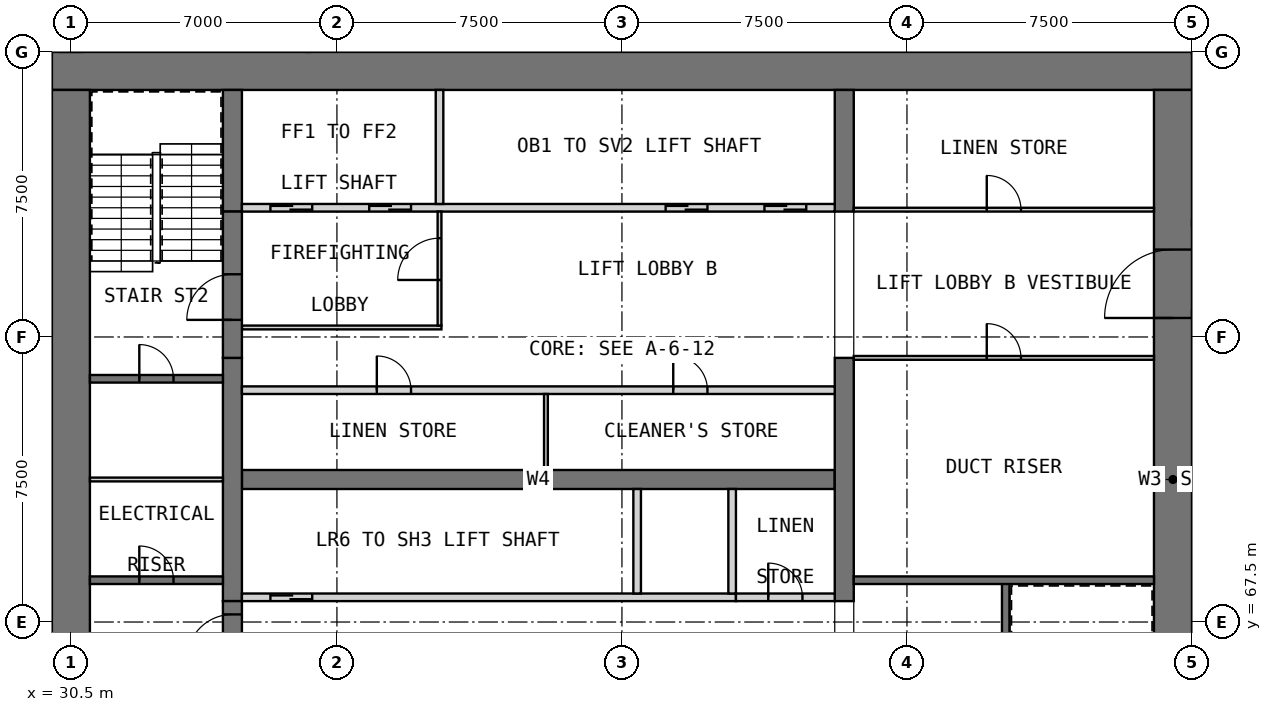
"""IFC4 building model, lengths in metres.
Left out: names, types, materials, properties, quantities, classifications, styles, units other than length and angle.
Written with IfcOpenShell. Run it as: python <this file> out.ifc"""

import sys

from ifc_helpers import new_model, si_unit, direction, frame, frame_2d, origin, place, context, subcontext, project, spatial, rectangle, extrude, element, fill, save


model = new_model("IFC4")
c1 = context("Model", 3, precision=1e-05, world=origin(), true_north=direction((0.0, 1.0)))
c2 = subcontext(c1, "Body", "Model", "MODEL_VIEW")
j1 = project(units=[si_unit("LENGTHUNIT", "METRE"), si_unit("PLANEANGLEUNIT", "RADIAN")], contexts=[c1])
p1 = place(None, origin())
s1 = spatial("IfcSite", under=j1, at=p1, CompositionType="ELEMENT")
p2 = place(p1, origin())
s2 = spatial("IfcBuilding", under=s1, at=p2, CompositionType="ELEMENT")
p3 = place(p2, frame((0.0, 0.0, 89.9)))
s3 = spatial("IfcBuildingStorey", under=s2, at=p3, CompositionType="ELEMENT", Elevation=89.9)
p4 = place(p3, frame((30.0, 82.0, 0.0), z_axis=(0.0, 0.0, 1.0), x_axis=(1.0, 0.0, 0.0)))
e1 = element("IfcWall", 1, at=p4, inside=s3, PredefinedType="SHEAR", context=c2, shape_type="SweptSolid", body=[
    extrude(rectangle(XDim=30.0, YDim=1.0, at=frame_2d((15.0, 0.0))), origin(), (0.0, 0.0, 1.0), 3.6),
])
p5 = place(p3, frame((30.5, 61.0, 0.0), z_axis=(0.0, 0.0, 1.0), x_axis=(0.0, 1.0, 0.0)))
e2 = element("IfcWall", 2, at=p5, inside=s3, PredefinedType="SHEAR", context=c2, shape_type="SweptSolid", body=[
    extrude(rectangle(XDim=20.5, YDim=1.0, at=frame_2d((10.25, 0.0))), origin(), (0.0, 0.0, 1.0), 3.6),
])
p6 = place(p3, frame((59.5, 61.0, 0.0), z_axis=(0.0, 0.0, 1.0), x_axis=(0.0, 1.0, 0.0)))
e3 = element("IfcWall", 3, at=p6, inside=s3, PredefinedType="SHEAR", context=c2, shape_type="SweptSolid", body=[
    extrude(rectangle(XDim=20.5, YDim=1.0, at=frame_2d((10.25, 0.0))), origin(), (0.0, 0.0, 1.0), 3.6),
])
p7 = place(p6, frame((14.5, 0.0, 0.0)))
e4 = element("IfcOpeningElement", 4, at=p7, cuts=e3, PredefinedType="OPENING", context=c2, shape_type="SweptSolid", body=[
    extrude(rectangle(XDim=1.8, YDim=2.1, at=frame_2d((0.9, 1.05))), frame((0.0, 0.51, 0.0), z_axis=(0.0, -1.0, 0.0), x_axis=(1.0, 0.0, 0.0)), (0.0, 0.0, 1.0), 1.02),
])
p8 = place(p3, frame((35.0, 71.25, 0.0), z_axis=(0.0, 0.0, 1.0), x_axis=(1.0, 0.0, 0.0)))
e5 = element("IfcWall", 5, at=p8, inside=s3, PredefinedType="SHEAR", context=c2, shape_type="SweptSolid", body=[
    extrude(rectangle(XDim=15.6, YDim=0.5, at=frame_2d((7.8, 0.0))), origin(), (0.0, 0.0, 1.0), 3.6),
])
p9 = place(p3, frame((34.75, 68.05, 0.0), z_axis=(0.0, 0.0, 1.0), x_axis=(0.0, 1.0, 0.0)))
e6 = element("IfcWall", 6, at=p9, inside=s3, PredefinedType="SHEAR", context=c2, shape_type="SweptSolid", body=[
    extrude(rectangle(XDim=6.4, YDim=0.5, at=frame_2d((3.2, 0.0))), origin(), (0.0, 0.0, 1.0), 3.6),
])
p10 = place(p3, frame((34.75, 78.3, 0.0), z_axis=(0.0, 0.0, 1.0), x_axis=(0.0, 1.0, 0.0)))
e7 = element("IfcWall", 7, at=p10, inside=s3, PredefinedType="SHEAR", context=c2, shape_type="SweptSolid", body=[
    extrude(rectangle(XDim=3.2, YDim=0.5, at=frame_2d((1.6, 0.0))), origin(), (0.0, 0.0, 1.0), 3.6),
])
p11 = place(p3, frame((50.85, 68.05, 0.0), z_axis=(0.0, 0.0, 1.0), x_axis=(0.0, 1.0, 0.0)))
e8 = element("IfcWall", 8, at=p11, inside=s3, PredefinedType="SHEAR", context=c2, shape_type="SweptSolid", body=[
    extrude(rectangle(XDim=6.4, YDim=0.5, at=frame_2d((3.2, 0.0))), origin(), (0.0, 0.0, 1.0), 3.6),
])
p12 = place(p3, frame((50.85, 78.3, 0.0), z_axis=(0.0, 0.0, 1.0), x_axis=(0.0, 1.0, 0.0)))
e9 = element("IfcWall", 9, at=p12, inside=s3, PredefinedType="SHEAR", context=c2, shape_type="SweptSolid", body=[
    extrude(rectangle(XDim=3.2, YDim=0.5, at=frame_2d((1.6, 0.0))), origin(), (0.0, 0.0, 1.0), 3.6),
])
p13 = place(p3, frame((35.0, 68.15, 0.0), z_axis=(0.0, 0.0, 1.0), x_axis=(1.0, 0.0, 0.0)))
e10 = element("IfcWall", 10, at=p13, inside=s3, PredefinedType="SOLIDWALL", context=c2, shape_type="SweptSolid", body=[
    extrude(rectangle(XDim=13.0, YDim=0.2, at=frame_2d((6.5, 0.0))), origin(), (0.0, 0.0, 1.0), 3.6),
])
p14 = place(p13, frame((0.75, 0.0, 0.0)))
e11 = element("IfcOpeningElement", 11, at=p14, cuts=e10, PredefinedType="OPENING", context=c2, shape_type="SweptSolid", body=[
    extrude(rectangle(XDim=1.1, YDim=2.1, at=frame_2d((0.55, 1.05))), frame((0.0, 0.11, 0.0), z_axis=(0.0, -1.0, 0.0), x_axis=(1.0, 0.0, 0.0)), (0.0, 0.0, 1.0), 0.22),
])
for number, where, z_axis, x_axis in (
    (12, (45.4, 68.25, 0.0), (0.0, 0.0, 1.0), (0.0, 1.0, 0.0)),
    (13, (47.9, 68.25, 0.0), (0.0, 0.0, 1.0), (0.0, 1.0, 0.0)),
):
    element("IfcWall", number, at=place(p3, frame(where, z_axis=z_axis, x_axis=x_axis)), inside=s3, PredefinedType="SOLIDWALL", context=c2, shape_type="SweptSolid", body=[
        extrude(rectangle(XDim=2.75, YDim=0.2, at=frame_2d((1.375, 0.0))), origin(), (0.0, 0.0, 1.0), 3.6),
    ])
p15 = place(p3, frame((48.0, 68.15, 0.0), z_axis=(0.0, 0.0, 1.0), x_axis=(1.0, 0.0, 0.0)))
e14 = element("IfcWall", 14, at=p15, inside=s3, PredefinedType="PARTITIONING", context=c2, shape_type="SweptSolid", body=[
    extrude(rectangle(XDim=2.6, YDim=0.2, at=frame_2d((1.3, 0.0))), origin(), (0.0, 0.0, 1.0), 3.35),
])
p16 = place(p15, frame((0.85, 0.0, 0.0)))
e15 = element("IfcOpeningElement", 15, at=p16, cuts=e14, PredefinedType="OPENING", context=c2, shape_type="SweptSolid", body=[
    extrude(rectangle(XDim=0.9, YDim=2.1, at=frame_2d((0.45, 1.05))), frame((0.0, 0.11, 0.0), z_axis=(0.0, -1.0, 0.0), x_axis=(1.0, 0.0, 0.0)), (0.0, 0.0, 1.0), 0.22),
])
p17 = place(p3, frame((35.0, 73.6, 0.0), z_axis=(0.0, 0.0, 1.0), x_axis=(1.0, 0.0, 0.0)))
e16 = element("IfcWall", 16, at=p17, inside=s3, PredefinedType="PARTITIONING", context=c2, shape_type="SweptSolid", body=[
    extrude(rectangle(XDim=15.6, YDim=0.2, at=frame_2d((7.8, 0.0))), origin(), (0.0, 0.0, 1.0), 3.35),
])
p18 = place(p17, frame((3.55, 0.0, 0.0)))
e17 = element("IfcOpeningElement", 17, at=p18, cuts=e16, PredefinedType="OPENING", context=c2, shape_type="SweptSolid", body=[
    extrude(rectangle(XDim=0.9, YDim=2.1, at=frame_2d((0.45, 1.05))), frame((0.0, 0.11, 0.0), z_axis=(0.0, -1.0, 0.0), x_axis=(1.0, 0.0, 0.0)), (0.0, 0.0, 1.0), 0.22),
])
p19 = place(p17, frame((11.35, 0.0, 0.0)))
e18 = element("IfcOpeningElement", 18, at=p19, cuts=e16, PredefinedType="OPENING", context=c2, shape_type="SweptSolid", body=[
    extrude(rectangle(XDim=0.9, YDim=2.1, at=frame_2d((0.45, 1.05))), frame((0.0, 0.11, 0.0), z_axis=(0.0, -1.0, 0.0), x_axis=(1.0, 0.0, 0.0)), (0.0, 0.0, 1.0), 0.22),
])
p20 = place(p3, frame((43.0, 71.5, 0.0), z_axis=(0.0, 0.0, 1.0), x_axis=(0.0, 1.0, 0.0)))
e19 = element("IfcWall", 19, at=p20, inside=s3, PredefinedType="PARTITIONING", context=c2, shape_type="SweptSolid", body=[
    extrude(rectangle(XDim=2.0, YDim=0.1, at=frame_2d((1.0, 0.0))), origin(), (0.0, 0.0, 1.0), 3.35),
])
p21 = place(p3, frame((35.0, 78.4, 0.0), z_axis=(0.0, 0.0, 1.0), x_axis=(1.0, 0.0, 0.0)))
e20 = element("IfcWall", 20, at=p21, inside=s3, PredefinedType="SOLIDWALL", context=c2, shape_type="SweptSolid", body=[
    extrude(rectangle(XDim=15.6, YDim=0.2, at=frame_2d((7.8, 0.0))), origin(), (0.0, 0.0, 1.0), 3.6),
])
p22 = place(p21, frame((0.75, 0.0, 0.0)))
e21 = element("IfcOpeningElement", 21, at=p22, cuts=e20, PredefinedType="OPENING", context=c2, shape_type="SweptSolid", body=[
    extrude(rectangle(XDim=1.1, YDim=2.1, at=frame_2d((0.55, 1.05))), frame((0.0, 0.11, 0.0), z_axis=(0.0, -1.0, 0.0), x_axis=(1.0, 0.0, 0.0)), (0.0, 0.0, 1.0), 0.22),
])
p23 = place(p21, frame((3.35, 0.0, 0.0)))
e22 = element("IfcOpeningElement", 22, at=p23, cuts=e20, PredefinedType="OPENING", context=c2, shape_type="SweptSolid", body=[
    extrude(rectangle(XDim=1.1, YDim=2.1, at=frame_2d((0.55, 1.05))), frame((0.0, 0.11, 0.0), z_axis=(0.0, -1.0, 0.0), x_axis=(1.0, 0.0, 0.0)), (0.0, 0.0, 1.0), 0.22),
])
p24 = place(p21, frame((11.15, 0.0, 0.0)))
e23 = element("IfcOpeningElement", 23, at=p24, cuts=e20, PredefinedType="OPENING", context=c2, shape_type="SweptSolid", body=[
    extrude(rectangle(XDim=1.1, YDim=2.1, at=frame_2d((0.55, 1.05))), frame((0.0, 0.11, 0.0), z_axis=(0.0, -1.0, 0.0), x_axis=(1.0, 0.0, 0.0)), (0.0, 0.0, 1.0), 0.22),
])
p25 = place(p21, frame((13.75, 0.0, 0.0)))
e24 = element("IfcOpeningElement", 24, at=p25, cuts=e20, PredefinedType="OPENING", context=c2, shape_type="SweptSolid", body=[
    extrude(rectangle(XDim=1.1, YDim=2.1, at=frame_2d((0.55, 1.05))), frame((0.0, 0.11, 0.0), z_axis=(0.0, -1.0, 0.0), x_axis=(1.0, 0.0, 0.0)), (0.0, 0.0, 1.0), 0.22),
])
p26 = place(p3, frame((40.2, 78.5, 0.0), z_axis=(0.0, 0.0, 1.0), x_axis=(0.0, 1.0, 0.0)))
e25 = element("IfcWall", 25, at=p26, inside=s3, PredefinedType="SOLIDWALL", context=c2, shape_type="SweptSolid", body=[
    extrude(rectangle(XDim=3.0, YDim=0.2, at=frame_2d((1.5, 0.0))), origin(), (0.0, 0.0, 1.0), 3.6),
])
p27 = place(p3, frame((35.0, 75.25, 0.0), z_axis=(0.0, 0.0, 1.0), x_axis=(1.0, 0.0, 0.0)))
e26 = element("IfcWall", 26, at=p27, inside=s3, PredefinedType="PARTITIONING", context=c2, shape_type="SweptSolid", body=[
    extrude(rectangle(XDim=5.25, YDim=0.1, at=frame_2d((2.625, 0.0))), origin(), (0.0, 0.0, 1.0), 3.35),
])
p28 = place(p3, frame((40.2, 75.3, 0.0), z_axis=(0.0, 0.0, 1.0), x_axis=(0.0, 1.0, 0.0)))
e27 = element("IfcWall", 27, at=p28, inside=s3, PredefinedType="PARTITIONING", context=c2, shape_type="SweptSolid", body=[
    extrude(rectangle(XDim=3.0, YDim=0.1, at=frame_2d((1.5, 0.0))), origin(), (0.0, 0.0, 1.0), 3.35),
])
p29 = place(p28, frame((1.2, 0.0, 0.0)))
e28 = element("IfcOpeningElement", 28, at=p29, cuts=e27, PredefinedType="OPENING", context=c2, shape_type="SweptSolid", body=[
    extrude(rectangle(XDim=1.1, YDim=2.1, at=frame_2d((0.55, 1.05))), frame((0.0, 0.06, 0.0), z_axis=(0.0, -1.0, 0.0), x_axis=(1.0, 0.0, 0.0)), (0.0, 0.0, 1.0), 0.12),
])
p30 = place(p3, frame((34.75, 64.2, 0.0), z_axis=(0.0, 0.0, 1.0), x_axis=(0.0, 1.0, 0.0)))
e29 = element("IfcWall", 29, at=p30, inside=s3, PredefinedType="SOLIDWALL", context=c2, shape_type="SweptSolid", body=[
    extrude(rectangle(XDim=3.85, YDim=0.5, at=frame_2d((1.925, 0.0))), origin(), (0.0, 0.0, 1.0), 2.4),
])
p31 = place(p30, frame((2.3, 0.0, 0.0)))
e30 = element("IfcOpeningElement", 30, at=p31, cuts=e29, PredefinedType="OPENING", context=c2, shape_type="SweptSolid", body=[
    extrude(rectangle(XDim=1.2, YDim=2.1, at=frame_2d((0.6, 1.05))), frame((0.0, 0.26, 0.0), z_axis=(0.0, -1.0, 0.0), x_axis=(1.0, 0.0, 0.0)), (0.0, 0.0, 1.0), 0.52),
])
p32 = place(p3, frame((34.75, 74.45, 0.0), z_axis=(0.0, 0.0, 1.0), x_axis=(0.0, 1.0, 0.0)))
e31 = element("IfcWall", 31, at=p32, inside=s3, PredefinedType="SOLIDWALL", context=c2, shape_type="SweptSolid", body=[
    extrude(rectangle(XDim=3.85, YDim=0.5, at=frame_2d((1.925, 0.0))), origin(), (0.0, 0.0, 1.0), 2.4),
])
p33 = place(p32, frame((1.0, 0.0, 0.0)))
e32 = element("IfcOpeningElement", 32, at=p33, cuts=e31, PredefinedType="OPENING", context=c2, shape_type="SweptSolid", body=[
    extrude(rectangle(XDim=1.2, YDim=2.1, at=frame_2d((0.6, 1.05))), frame((0.0, 0.26, 0.0), z_axis=(0.0, -1.0, 0.0), x_axis=(1.0, 0.0, 0.0)), (0.0, 0.0, 1.0), 0.52),
])
p34 = place(p3, frame((31.0, 68.6, 0.0), z_axis=(0.0, 0.0, 1.0), x_axis=(1.0, 0.0, 0.0)))
e33 = element("IfcWall", 33, at=p34, inside=s3, PredefinedType="SOLIDWALL", context=c2, shape_type="SweptSolid", body=[
    extrude(rectangle(XDim=3.5, YDim=0.2, at=frame_2d((1.75, 0.0))), origin(), (0.0, 0.0, 1.0), 3.35),
])
p35 = place(p34, frame((1.3, 0.0, 0.0)))
e34 = element("IfcOpeningElement", 34, at=p35, cuts=e33, PredefinedType="OPENING", context=c2, shape_type="SweptSolid", body=[
    extrude(rectangle(XDim=0.9, YDim=2.1, at=frame_2d((0.45, 1.05))), frame((0.0, 0.11, 0.0), z_axis=(0.0, -1.0, 0.0), x_axis=(1.0, 0.0, 0.0)), (0.0, 0.0, 1.0), 0.22),
])
p36 = place(p3, frame((31.0, 73.9, 0.0), z_axis=(0.0, 0.0, 1.0), x_axis=(1.0, 0.0, 0.0)))
e35 = element("IfcWall", 35, at=p36, inside=s3, PredefinedType="SOLIDWALL", context=c2, shape_type="SweptSolid", body=[
    extrude(rectangle(XDim=3.5, YDim=0.2, at=frame_2d((1.75, 0.0))), origin(), (0.0, 0.0, 1.0), 3.35),
])
p37 = place(p36, frame((1.3, 0.0, 0.0)))
e36 = element("IfcOpeningElement", 36, at=p37, cuts=e35, PredefinedType="OPENING", context=c2, shape_type="SweptSolid", body=[
    extrude(rectangle(XDim=0.9, YDim=2.1, at=frame_2d((0.45, 1.05))), frame((0.0, 0.11, 0.0), z_axis=(0.0, -1.0, 0.0), x_axis=(1.0, 0.0, 0.0)), (0.0, 0.0, 1.0), 0.22),
])
p38 = place(p3, frame((55.1, 61.0, 0.0), z_axis=(0.0, 0.0, 1.0), x_axis=(0.0, 1.0, 0.0)))
e37 = element("IfcWall", 37, at=p38, inside=s3, PredefinedType="SOLIDWALL", context=c2, shape_type="SweptSolid", body=[
    extrude(rectangle(XDim=7.6, YDim=0.2, at=frame_2d((3.8, 0.0))), origin(), (0.0, 0.0, 1.0), 3.35),
])
p39 = place(p3, frame((51.1, 68.6, 0.0), z_axis=(0.0, 0.0, 1.0), x_axis=(1.0, 0.0, 0.0)))
e38 = element("IfcWall", 38, at=p39, inside=s3, PredefinedType="SOLIDWALL", context=c2, shape_type="SweptSolid", body=[
    extrude(rectangle(XDim=7.9, YDim=0.2, at=frame_2d((3.95, 0.0))), origin(), (0.0, 0.0, 1.0), 3.35),
])
p40 = place(p3, frame((31.0, 71.25, 0.0), z_axis=(0.0, 0.0, 1.0), x_axis=(1.0, 0.0, 0.0)))
e39 = element("IfcWall", 39, at=p40, inside=s3, PredefinedType="PARTITIONING", context=c2, shape_type="SweptSolid", body=[
    extrude(rectangle(XDim=3.5, YDim=0.1, at=frame_2d((1.75, 0.0))), origin(), (0.0, 0.0, 1.0), 3.35),
])
p41 = place(p3, frame((51.1, 74.45, 0.0), z_axis=(0.0, 0.0, 1.0), x_axis=(1.0, 0.0, 0.0)))
e40 = element("IfcWall", 40, at=p41, inside=s3, PredefinedType="PARTITIONING", context=c2, shape_type="SweptSolid", body=[
    extrude(rectangle(XDim=7.9, YDim=0.1, at=frame_2d((3.95, 0.0))), origin(), (0.0, 0.0, 1.0), 3.35),
])
p42 = place(p41, frame((3.5, 0.0, 0.0)))
e41 = element("IfcOpeningElement", 41, at=p42, cuts=e40, PredefinedType="OPENING", context=c2, shape_type="SweptSolid", body=[
    extrude(rectangle(XDim=0.9, YDim=2.1, at=frame_2d((0.45, 1.05))), frame((0.0, 0.06, 0.0), z_axis=(0.0, -1.0, 0.0), x_axis=(1.0, 0.0, 0.0)), (0.0, 0.0, 1.0), 0.12),
])
p43 = place(p3, frame((51.1, 78.35, 0.0), z_axis=(0.0, 0.0, 1.0), x_axis=(1.0, 0.0, 0.0)))
e42 = element("IfcWall", 42, at=p43, inside=s3, PredefinedType="PARTITIONING", context=c2, shape_type="SweptSolid", body=[
    extrude(rectangle(XDim=7.9, YDim=0.1, at=frame_2d((3.95, 0.0))), origin(), (0.0, 0.0, 1.0), 3.35),
])
p44 = place(p43, frame((3.5, 0.0, 0.0)))
e43 = element("IfcOpeningElement", 43, at=p44, cuts=e42, PredefinedType="OPENING", context=c2, shape_type="SweptSolid", body=[
    extrude(rectangle(XDim=0.9, YDim=2.1, at=frame_2d((0.45, 1.05))), frame((0.0, 0.06, 0.0), z_axis=(0.0, -1.0, 0.0), x_axis=(1.0, 0.0, 0.0)), (0.0, 0.0, 1.0), 0.12),
])
p45 = place(p3, frame((60.0, 82.5, 0.0), z_axis=(0.0, 0.0, 1.0), x_axis=(1.0, 0.0, 0.0)))
e44 = element("IfcWall", 44, at=p45, inside=s3, PredefinedType="PARTITIONING", context=c2, shape_type="SweptSolid", body=[
    extrude(rectangle(XDim=14.925, YDim=0.1, at=frame_2d((7.462, 0.0))), origin(), (0.0, 0.0, 1.0), 3.35),
])
p46 = place(p3, frame((36.75, 82.5, 0.0), z_axis=(0.0, 0.0, 1.0), x_axis=(0.0, 1.0, 0.0)))
e45 = element("IfcWall", 45, at=p46, inside=s3, PredefinedType="PARTITIONING", context=c2, shape_type="SweptSolid", body=[
    extrude(rectangle(XDim=7.425, YDim=0.1, at=frame_2d((3.712, 0.0))), origin(), (0.0, 0.0, 1.0), 3.35),
])
p47 = place(p14, origin())
e46 = element("IfcDoor", 46, at=p47, inside=s3, OperationType="DOUBLE_DOOR_SLIDING", PredefinedType="DOOR", context=c2, shape_type="SweptSolid", body=[
    extrude(rectangle(XDim=1.1, YDim=2.1, at=frame_2d((0.55, 1.05))), frame((0.0, 0.025, 0.0), z_axis=(0.0, -1.0, 0.0), x_axis=(1.0, 0.0, 0.0)), (0.0, 0.0, 1.0), 0.05),
])
fill(e11, e46)
p48 = place(p16, origin())
e47 = element("IfcDoor", 47, at=p48, inside=s3, OperationType="SINGLE_SWING_LEFT", PredefinedType="DOOR", context=c2, shape_type="SweptSolid", body=[
    extrude(rectangle(XDim=0.9, YDim=2.1, at=frame_2d((0.45, 1.05))), frame((0.0, 0.025, 0.0), z_axis=(0.0, -1.0, 0.0), x_axis=(1.0, 0.0, 0.0)), (0.0, 0.0, 1.0), 0.05),
])
fill(e15, e47)
p49 = place(p18, origin())
e48 = element("IfcDoor", 48, at=p49, inside=s3, OperationType="SINGLE_SWING_LEFT", PredefinedType="DOOR", context=c2, shape_type="SweptSolid", body=[
    extrude(rectangle(XDim=0.9, YDim=2.1, at=frame_2d((0.45, 1.05))), frame((0.0, 0.025, 0.0), z_axis=(0.0, -1.0, 0.0), x_axis=(1.0, 0.0, 0.0)), (0.0, 0.0, 1.0), 0.05),
])
fill(e17, e48)
p50 = place(p19, origin())
e49 = element("IfcDoor", 49, at=p50, inside=s3, OperationType="SINGLE_SWING_RIGHT", PredefinedType="DOOR", context=c2, shape_type="SweptSolid", body=[
    extrude(rectangle(XDim=0.9, YDim=2.1, at=frame_2d((0.45, 1.05))), frame((0.0, 0.025, 0.0), z_axis=(0.0, -1.0, 0.0), x_axis=(1.0, 0.0, 0.0)), (0.0, 0.0, 1.0), 0.05),
])
fill(e18, e49)
p51 = place(p22, origin())
e50 = element("IfcDoor", 50, at=p51, inside=s3, OperationType="DOUBLE_DOOR_SLIDING", PredefinedType="DOOR", context=c2, shape_type="SweptSolid", body=[
    extrude(rectangle(XDim=1.1, YDim=2.1, at=frame_2d((0.55, 1.05))), frame((0.0, 0.025, 0.0), z_axis=(0.0, -1.0, 0.0), x_axis=(1.0, 0.0, 0.0)), (0.0, 0.0, 1.0), 0.05),
])
fill(e21, e50)
p52 = place(p23, origin())
e51 = element("IfcDoor", 51, at=p52, inside=s3, OperationType="DOUBLE_DOOR_SLIDING", PredefinedType="DOOR", context=c2, shape_type="SweptSolid", body=[
    extrude(rectangle(XDim=1.1, YDim=2.1, at=frame_2d((0.55, 1.05))), frame((0.0, 0.025, 0.0), z_axis=(0.0, -1.0, 0.0), x_axis=(1.0, 0.0, 0.0)), (0.0, 0.0, 1.0), 0.05),
])
fill(e22, e51)
p53 = place(p24, origin())
e52 = element("IfcDoor", 52, at=p53, inside=s3, OperationType="DOUBLE_DOOR_SLIDING", PredefinedType="DOOR", context=c2, shape_type="SweptSolid", body=[
    extrude(rectangle(XDim=1.1, YDim=2.1, at=frame_2d((0.55, 1.05))), frame((0.0, 0.025, 0.0), z_axis=(0.0, -1.0, 0.0), x_axis=(1.0, 0.0, 0.0)), (0.0, 0.0, 1.0), 0.05),
])
fill(e23, e52)
p54 = place(p25, origin())
e53 = element("IfcDoor", 53, at=p54, inside=s3, OperationType="DOUBLE_DOOR_SLIDING", PredefinedType="DOOR", context=c2, shape_type="SweptSolid", body=[
    extrude(rectangle(XDim=1.1, YDim=2.1, at=frame_2d((0.55, 1.05))), frame((0.0, 0.025, 0.0), z_axis=(0.0, -1.0, 0.0), x_axis=(1.0, 0.0, 0.0)), (0.0, 0.0, 1.0), 0.05),
])
fill(e24, e53)
p55 = place(p7, origin())
e54 = element("IfcDoor", 54, at=p55, inside=s3, OperationType="DOUBLE_DOOR_SINGLE_SWING", PredefinedType="DOOR", context=c2, shape_type="SweptSolid", body=[
    extrude(rectangle(XDim=1.8, YDim=2.1, at=frame_2d((0.9, 1.05))), frame((0.0, 0.025, 0.0), z_axis=(0.0, -1.0, 0.0), x_axis=(1.0, 0.0, 0.0)), (0.0, 0.0, 1.0), 0.05),
])
fill(e4, e54)
p56 = place(p29, origin())
e55 = element("IfcDoor", 55, at=p56, inside=s3, OperationType="SINGLE_SWING_LEFT", PredefinedType="DOOR", context=c2, shape_type="SweptSolid", body=[
    extrude(rectangle(XDim=1.1, YDim=2.1, at=frame_2d((0.55, 1.05))), frame((0.0, 0.025, 0.0), z_axis=(0.0, -1.0, 0.0), x_axis=(1.0, 0.0, 0.0)), (0.0, 0.0, 1.0), 0.05),
])
fill(e28, e55)
p57 = place(p31, origin())
e56 = element("IfcDoor", 56, at=p57, inside=s3, OperationType="SINGLE_SWING_LEFT", PredefinedType="DOOR", context=c2, shape_type="SweptSolid", body=[
    extrude(rectangle(XDim=1.2, YDim=2.1, at=frame_2d((0.6, 1.05))), frame((0.0, 0.025, 0.0), z_axis=(0.0, -1.0, 0.0), x_axis=(1.0, 0.0, 0.0)), (0.0, 0.0, 1.0), 0.05),
])
fill(e30, e56)
p58 = place(p33, origin())
e57 = element("IfcDoor", 57, at=p58, inside=s3, OperationType="SINGLE_SWING_RIGHT", PredefinedType="DOOR", context=c2, shape_type="SweptSolid", body=[
    extrude(rectangle(XDim=1.2, YDim=2.1, at=frame_2d((0.6, 1.05))), frame((0.0, 0.025, 0.0), z_axis=(0.0, -1.0, 0.0), x_axis=(1.0, 0.0, 0.0)), (0.0, 0.0, 1.0), 0.05),
])
fill(e32, e57)
p59 = place(p35, origin())
e58 = element("IfcDoor", 58, at=p59, inside=s3, OperationType="SINGLE_SWING_LEFT", PredefinedType="DOOR", context=c2, shape_type="SweptSolid", body=[
    extrude(rectangle(XDim=0.9, YDim=2.1, at=frame_2d((0.45, 1.05))), frame((0.0, 0.025, 0.0), z_axis=(0.0, -1.0, 0.0), x_axis=(1.0, 0.0, 0.0)), (0.0, 0.0, 1.0), 0.05),
])
fill(e34, e58)
p60 = place(p37, origin())
e59 = element("IfcDoor", 59, at=p60, inside=s3, OperationType="SINGLE_SWING_RIGHT", PredefinedType="DOOR", context=c2, shape_type="SweptSolid", body=[
    extrude(rectangle(XDim=0.9, YDim=2.1, at=frame_2d((0.45, 1.05))), frame((0.0, 0.025, 0.0), z_axis=(0.0, -1.0, 0.0), x_axis=(1.0, 0.0, 0.0)), (0.0, 0.0, 1.0), 0.05),
])
fill(e36, e59)
p61 = place(p42, origin())
e60 = element("IfcDoor", 60, at=p61, inside=s3, OperationType="SINGLE_SWING_LEFT", PredefinedType="DOOR", context=c2, shape_type="SweptSolid", body=[
    extrude(rectangle(XDim=0.9, YDim=2.1, at=frame_2d((0.45, 1.05))), frame((0.0, 0.025, 0.0), z_axis=(0.0, -1.0, 0.0), x_axis=(1.0, 0.0, 0.0)), (0.0, 0.0, 1.0), 0.05),
])
fill(e41, e60)
p62 = place(p44, origin())
e61 = element("IfcDoor", 61, at=p62, inside=s3, OperationType="SINGLE_SWING_LEFT", PredefinedType="DOOR", context=c2, shape_type="SweptSolid", body=[
    extrude(rectangle(XDim=0.9, YDim=2.1, at=frame_2d((0.45, 1.05))), frame((0.0, 0.025, 0.0), z_axis=(0.0, -1.0, 0.0), x_axis=(1.0, 0.0, 0.0)), (0.0, 0.0, 1.0), 0.05),
])
fill(e43, e61)
save(model, sys.argv[1])
